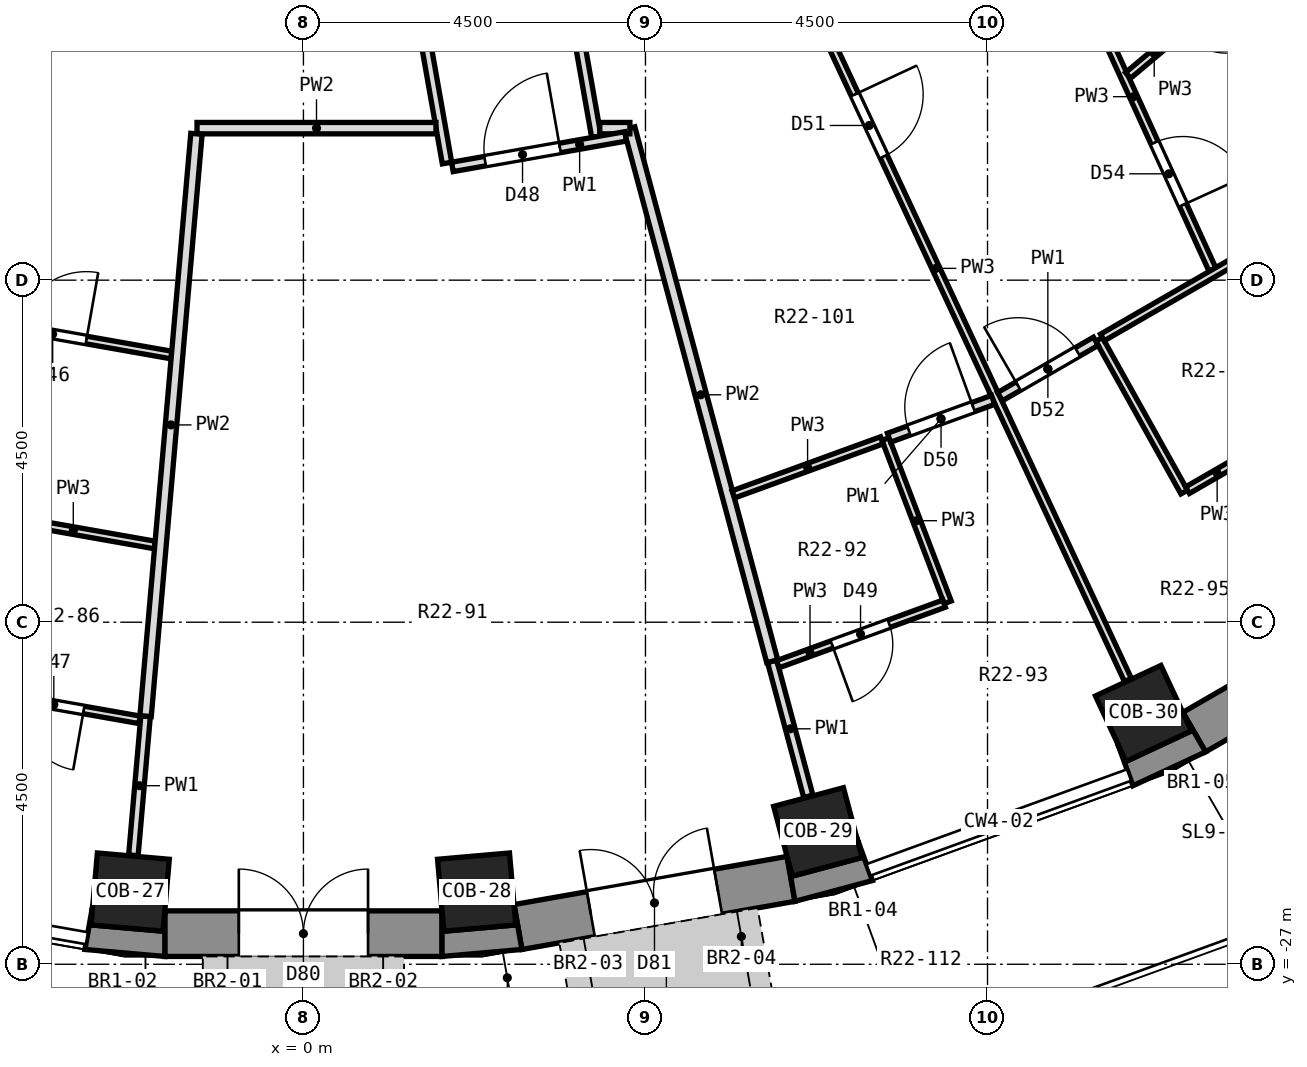
"""IFC4 building model, lengths in metres.
Left out: names, types, materials, properties, quantities, classifications, styles, units other than length and angle.
Written with IfcOpenShell. Run it as: python <this file> out.ifc"""

import sys

from ifc_helpers import new_model, si_unit, direction, frame, frame_2d, origin, origin_2d, place, context, subcontext, project, spatial, polyline, rectangle, outline, extrude, element, fill, save


model = new_model("IFC4")
c1 = context("Model", 3, precision=1e-05, world=origin(), true_north=direction((0.0, 1.0)))
c2 = subcontext(c1, "Body", "Model", "MODEL_VIEW")
j1 = project(units=[si_unit("LENGTHUNIT", "METRE"), si_unit("PLANEANGLEUNIT", "RADIAN")], contexts=[c1])
p1 = place(None, origin())
s1 = spatial("IfcSite", under=j1, at=p1, CompositionType="ELEMENT")
p2 = place(p1, origin())
s2 = spatial("IfcBuilding", under=s1, at=p2, CompositionType="ELEMENT")
p3 = place(p2, frame((0.0, 0.0, 141.4)))
s3 = spatial("IfcBuildingStorey", under=s2, at=p3, CompositionType="ELEMENT", Elevation=141.4)
for number, where, z_axis, x_axis in (
    (1, (-2.279, -26.051, 0.0), (0.0, 0.0, 1.0), (-0.087, -0.996, 0.0)),
    (2, (2.279, -26.051, 0.0), (0.0, 0.0, 1.0), (0.087, -0.996, 0.0)),
    (3, (6.768, -25.259, 0.0), (0.0, 0.0, 1.0), (0.259, -0.966, 0.0)),
    (4, (11.052, -23.7, 0.0), (0.0, 0.0, 1.0), (0.423, -0.906, 0.0)),
):
    element("IfcColumn", number, at=place(p3, frame(where, z_axis=z_axis, x_axis=x_axis)), inside=s3, PredefinedType="COLUMN", context=c2, shape_type="SweptSolid", body=[
        extrude(rectangle(XDim=0.95, YDim=0.95, at=origin_2d()), origin(), (0.0, 0.0, 1.0), 3.3),
    ])
p4 = place(p3, frame((-1.824, -26.597, 0.0), z_axis=(0.0, 0.0, 1.0), x_axis=(1.0, 0.0, 0.0)))
e5 = element("IfcWall", 5, at=p4, inside=s3, PredefinedType="SOLIDWALL", context=c2, shape_type="SweptSolid", body=[
    extrude(rectangle(XDim=3.648, YDim=0.6, at=frame_2d((1.824, 0.0))), origin(), (0.0, 0.0, 1.0), 2.8),
])
p5 = place(p4, frame((0.974, 0.0, 0.0)))
e6 = element("IfcOpeningElement", 6, at=p5, cuts=e5, PredefinedType="OPENING", context=c2, shape_type="SweptSolid", body=[
    extrude(rectangle(XDim=1.7, YDim=2.4, at=frame_2d((0.85, 1.2))), frame((0.0, 0.312, 0.0), z_axis=(0.0, -1.0, 0.0), x_axis=(1.0, 0.0, 0.0)), (0.0, 0.0, 1.0), 0.624),
])
p6 = place(p3, frame((2.822, -26.51, 0.0), z_axis=(0.0, 0.0, 1.0), x_axis=(0.984803764455, 0.173670796382, 0.0)))
e7 = element("IfcWall", 7, at=p6, inside=s3, PredefinedType="SOLIDWALL", context=c2, shape_type="SweptSolid", body=[
    extrude(rectangle(XDim=3.648, YDim=0.6, at=frame_2d((1.824, 0.0))), origin(), (0.0, 0.0, 1.0), 2.8),
])
p7 = place(p6, frame((0.974, 0.0, 0.0)))
e8 = element("IfcOpeningElement", 8, at=p7, cuts=e7, PredefinedType="OPENING", context=c2, shape_type="SweptSolid", body=[
    extrude(rectangle(XDim=1.7, YDim=2.4, at=frame_2d((0.85, 1.2))), frame((0.0, 0.312, 0.0), z_axis=(0.0, -1.0, 0.0), x_axis=(1.0, 0.0, 0.0)), (0.0, 0.0, 1.0), 0.624),
])
p8 = place(p3, frame((11.719, -23.946, 0.0), z_axis=(0.0, 0.0, 1.0), x_axis=(0.866051847062, 0.499954196102, 0.0)))
e9 = element("IfcWall", 9, at=p8, inside=s3, PredefinedType="SOLIDWALL", context=c2, shape_type="SweptSolid", body=[
    extrude(rectangle(XDim=3.648, YDim=0.6, at=frame_2d((1.824, 0.0))), origin(), (0.0, 0.0, 1.0), 2.8),
])
p9 = place(p8, frame((0.674, 0.0, 0.9)))
e10 = element("IfcOpeningElement", 10, at=p9, cuts=e9, PredefinedType="OPENING", context=c2, shape_type="SweptSolid", body=[
    extrude(rectangle(XDim=2.3, YDim=1.8, at=frame_2d((1.15, 0.9))), frame((0.0, 0.312, 0.0), z_axis=(0.0, -1.0, 0.0), x_axis=(1.0, 0.0, 0.0)), (0.0, 0.0, 1.0), 0.624),
])
p10 = place(p3, origin())
e11 = element("IfcWall", 11, at=p10, inside=s3, PredefinedType="SOLIDWALL", context=c2, shape_type="SweptSolid", body=[
    extrude(outline(polyline([(-2.875, -26.805), (-1.824, -26.897), (-1.824, -26.297), (-1.847, -26.565), (-2.794, -26.482), (-2.77, -26.215), (-2.875, -26.805)])), origin(), (0.0, 0.0, 1.0), 2.8),
])
p11 = place(p3, origin())
e12 = element("IfcWall", 12, at=p11, inside=s3, PredefinedType="SOLIDWALL", context=c2, shape_type="SweptSolid", body=[
    extrude(outline(polyline([(2.875, -26.805), (2.77, -26.215), (2.794, -26.482), (1.847, -26.565), (1.824, -26.297), (1.824, -26.897), (2.875, -26.805)])), origin(), (0.0, 0.0, 1.0), 2.8),
])
p12 = place(p3, origin())
e13 = element("IfcWall", 13, at=p12, inside=s3, PredefinedType="SOLIDWALL", context=c2, shape_type="SweptSolid", body=[
    extrude(outline(polyline([(6.467, -26.172), (7.486, -25.899), (7.28, -25.335), (7.35, -25.595), (6.432, -25.841), (6.363, -25.581), (6.467, -26.172)])), origin(), (0.0, 0.0, 1.0), 2.8),
])
p13 = place(p3, origin())
e14 = element("IfcWall", 14, at=p13, inside=s3, PredefinedType="SOLIDWALL", context=c2, shape_type="SweptSolid", body=[
    extrude(outline(polyline([(10.913, -24.651), (11.869, -24.206), (11.569, -23.686), (11.683, -23.93), (10.822, -24.331), (10.708, -24.087), (10.913, -24.651)])), origin(), (0.0, 0.0, 1.0), 2.8),
])
p14 = place(p3, frame((1.032, -11.597, 0.0), z_axis=(0.0, 0.0, 1.0), x_axis=(0.173613257536, -0.984813909735, 0.0)))
e15 = element("IfcWall", 15, at=p14, inside=s3, PredefinedType="PARTITIONING", context=c2, shape_type="SweptSolid", body=[
    extrude(rectangle(XDim=4.937, YDim=0.125, at=frame_2d((2.469, 0.0))), origin(), (0.0, 0.0, 1.0), 2.8),
])
p15 = place(p3, frame((3.344, -13.22, 0.0), z_axis=(0.0, 0.0, 1.0), x_axis=(0.173704731119, -0.984797779438, 0.0)))
e16 = element("IfcWall", 16, at=p15, inside=s3, PredefinedType="PARTITIONING", context=c2, shape_type="SweptSolid", body=[
    extrude(rectangle(XDim=2.938, YDim=0.125, at=frame_2d((1.469, 0.0))), origin(), (0.0, 0.0, 1.0), 2.8),
])
p16 = place(p3, frame((6.166, -23.014, 0.0), z_axis=(0.0, 0.0, 1.0), x_axis=(0.258802424466, -0.965930279622, 0.0)))
e17 = element("IfcWall", 17, at=p16, inside=s3, PredefinedType="PARTITIONING", context=c2, shape_type="SweptSolid", body=[
    extrude(rectangle(XDim=1.84, YDim=0.125, at=frame_2d((0.92, 0.0))), origin(), (0.0, 0.0, 1.0), 2.8),
])
p17 = place(p3, frame((4.288, -16.002, 0.0), z_axis=(0.0, 0.0, 1.0), x_axis=(0.25900000819, -0.965877319207, 0.0)))
e18 = element("IfcWall", 18, at=p17, inside=s3, PredefinedType="PARTITIONING", context=c2, shape_type="SweptSolid", body=[
    extrude(rectangle(XDim=7.259, YDim=0.15, at=frame_2d((3.63, 0.0))), origin(), (0.0, 0.0, 1.0), 2.8),
])
p18 = place(p3, frame((7.657, -20.09, 0.0), z_axis=(0.0, 0.0, 1.0), x_axis=(0.35616749028, -0.934422130981, 0.0)))
e19 = element("IfcWall", 19, at=p18, inside=s3, PredefinedType="PARTITIONING", context=c2, shape_type="SweptSolid", body=[
    extrude(rectangle(XDim=2.3, YDim=0.1, at=frame_2d((1.15, 0.0))), origin(), (0.0, 0.0, 1.0), 2.8),
])
p19 = place(p3, frame((9.883, -13.312, 0.0), z_axis=(0.0, 0.0, 1.0), x_axis=(0.415273903312, -0.909696424764, 0.0)))
e20 = element("IfcWall", 20, at=p19, inside=s3, PredefinedType="PARTITIONING", context=c2, shape_type="SweptSolid", body=[
    extrude(rectangle(XDim=5.0, YDim=0.1, at=frame_2d((2.5, 0.0))), origin(), (0.0, 0.0, 1.0), 2.8),
])
p20 = place(p19, frame((3.166, 0.0, 0.0)))
e21 = element("IfcOpeningElement", 21, at=p20, cuts=e20, PredefinedType="OPENING", context=c2, shape_type="SweptSolid", body=[
    extrude(rectangle(XDim=0.9, YDim=2.1, at=frame_2d((0.45, 1.05))), frame((0.0, 0.062, 0.0), z_axis=(0.0, -1.0, 0.0), x_axis=(1.0, 0.0, 0.0)), (0.0, 0.0, 1.0), 0.124),
])
p21 = place(p3, frame((5.794, -12.43, 0.0), z_axis=(0.0, 0.0, 1.0), x_axis=(0.422795993745, -0.906224888023, 0.0)))
e22 = element("IfcWall", 22, at=p21, inside=s3, PredefinedType="PARTITIONING", context=c2, shape_type="SweptSolid", body=[
    extrude(rectangle(XDim=11.951, YDim=0.1, at=frame_2d((5.975, 0.0))), origin(), (0.0, 0.0, 1.0), 2.8),
])
p22 = place(p21, frame((3.451, 0.0, 0.0)))
e23 = element("IfcOpeningElement", 23, at=p22, cuts=e22, PredefinedType="OPENING", context=c2, shape_type="SweptSolid", body=[
    extrude(rectangle(XDim=0.9, YDim=2.1, at=frame_2d((0.45, 1.05))), frame((0.0, 0.062, 0.0), z_axis=(0.0, -1.0, 0.0), x_axis=(1.0, 0.0, 0.0)), (0.0, 0.0, 1.0), 0.124),
])
p23 = place(p3, frame((10.468, -18.779, 0.0), z_axis=(0.0, 0.0, 1.0), x_axis=(0.486886136125, -0.873465448915, 0.0)))
e24 = element("IfcWall", 24, at=p23, inside=s3, PredefinedType="PARTITIONING", context=c2, shape_type="SweptSolid", body=[
    extrude(rectangle(XDim=2.3, YDim=0.1, at=frame_2d((1.15, 0.0))), origin(), (0.0, 0.0, 1.0), 2.8),
])
p24 = place(p3, frame((-4.486, -23.373, 0.0), z_axis=(0.0, 0.0, 1.0), x_axis=(0.984805365509, -0.173661717325, 0.0)))
e25 = element("IfcWall", 25, at=p24, inside=s3, PredefinedType="PARTITIONING", context=c2, shape_type="SweptSolid", body=[
    extrude(rectangle(XDim=2.366, YDim=0.1, at=frame_2d((1.183, 0.0))), origin(), (0.0, 0.0, 1.0), 2.8),
])
p25 = place(p24, frame((0.821, 0.0, 0.0)))
e26 = element("IfcOpeningElement", 26, at=p25, cuts=e25, PredefinedType="OPENING", context=c2, shape_type="SweptSolid", body=[
    extrude(rectangle(XDim=0.8, YDim=2.1, at=frame_2d((0.4, 1.05))), frame((0.0, 0.062, 0.0), z_axis=(0.0, -1.0, 0.0), x_axis=(1.0, 0.0, 0.0)), (0.0, 0.0, 1.0), 0.124),
])
p26 = place(p3, frame((-4.101, -21.105, 0.0), z_axis=(0.0, 0.0, 1.0), x_axis=(0.984793705714, -0.173727825019, 0.0)))
e27 = element("IfcWall", 27, at=p26, inside=s3, PredefinedType="PARTITIONING", context=c2, shape_type="SweptSolid", body=[
    extrude(rectangle(XDim=2.18, YDim=0.1, at=frame_2d((1.09, 0.0))), origin(), (0.0, 0.0, 1.0), 2.8),
])
p27 = place(p3, frame((-4.887, -18.43, 0.0), z_axis=(0.0, 0.0, 1.0), x_axis=(0.984827318257, -0.173537181071, 0.0)))
e28 = element("IfcWall", 28, at=p27, inside=s3, PredefinedType="PARTITIONING", context=c2, shape_type="SweptSolid", body=[
    extrude(rectangle(XDim=3.199, YDim=0.1, at=frame_2d((1.6, 0.0))), origin(), (0.0, 0.0, 1.0), 2.8),
])
p28 = place(p27, frame((1.162, 0.0, 0.0)))
e29 = element("IfcOpeningElement", 29, at=p28, cuts=e28, PredefinedType="OPENING", context=c2, shape_type="SweptSolid", body=[
    extrude(rectangle(XDim=0.9, YDim=2.1, at=frame_2d((0.45, 1.05))), frame((0.0, 0.062, 0.0), z_axis=(0.0, -1.0, 0.0), x_axis=(1.0, 0.0, 0.0)), (0.0, 0.0, 1.0), 0.124),
])
p29 = place(p3, frame((-1.4, -16.0, 0.0), z_axis=(0.0, 0.0, 1.0), x_axis=(1.0, 0.0, 0.0)))
e30 = element("IfcWall", 30, at=p29, inside=s3, PredefinedType="PARTITIONING", context=c2, shape_type="SweptSolid", body=[
    extrude(rectangle(XDim=3.143, YDim=0.15, at=frame_2d((1.572, 0.0))), origin(), (0.0, 0.0, 1.0), 2.8),
])
p30 = place(p3, frame((3.899, -16.0, 0.0), z_axis=(0.0, 0.0, 1.0), x_axis=(1.0, 0.0, 0.0)))
e31 = element("IfcWall", 31, at=p30, inside=s3, PredefinedType="PARTITIONING", context=c2, shape_type="SweptSolid", body=[
    extrude(rectangle(XDim=0.396, YDim=0.15, at=frame_2d((0.198, 0.0))), origin(), (0.0, 0.0, 1.0), 2.8),
])
p31 = place(p3, frame((1.959, -16.51, 0.0), z_axis=(0.0, 0.0, 1.0), x_axis=(0.984826011904, 0.173544594492, 0.0)))
e32 = element("IfcWall", 32, at=p31, inside=s3, PredefinedType="PARTITIONING", context=c2, shape_type="SweptSolid", body=[
    extrude(rectangle(XDim=2.314, YDim=0.125, at=frame_2d((1.157, 0.0))), origin(), (0.0, 0.0, 1.0), 2.8),
])
p32 = place(p31, frame((0.437, 0.0, 0.0)))
e33 = element("IfcOpeningElement", 33, at=p32, cuts=e32, PredefinedType="OPENING", context=c2, shape_type="SweptSolid", body=[
    extrude(rectangle(XDim=1.0, YDim=2.1, at=frame_2d((0.5, 1.05))), frame((0.0, 0.074, 0.0), z_axis=(0.0, -1.0, 0.0), x_axis=(1.0, 0.0, 0.0)), (0.0, 0.0, 1.0), 0.149),
])
p33 = place(p3, frame((6.242, -23.053, 0.0), z_axis=(0.0, 0.0, 1.0), x_axis=(0.939618756308, 0.342223016166, 0.0)))
e34 = element("IfcWall", 34, at=p33, inside=s3, PredefinedType="PARTITIONING", context=c2, shape_type="SweptSolid", body=[
    extrude(rectangle(XDim=2.328, YDim=0.1, at=frame_2d((1.164, 0.0))), origin(), (0.0, 0.0, 1.0), 2.8),
])
p34 = place(p33, frame((0.758, 0.0, 0.0)))
e35 = element("IfcOpeningElement", 35, at=p34, cuts=e34, PredefinedType="OPENING", context=c2, shape_type="SweptSolid", body=[
    extrude(rectangle(XDim=0.8, YDim=2.1, at=frame_2d((0.4, 1.05))), frame((0.0, 0.062, 0.0), z_axis=(0.0, -1.0, 0.0), x_axis=(1.0, 0.0, 0.0)), (0.0, 0.0, 1.0), 0.124),
])
p35 = place(p3, frame((5.656, -20.818, 0.0), z_axis=(0.0, 0.0, 1.0), x_axis=(0.939728291625, 0.341922122596, 0.0)))
e36 = element("IfcWall", 36, at=p35, inside=s3, PredefinedType="PARTITIONING", context=c2, shape_type="SweptSolid", body=[
    extrude(rectangle(XDim=2.08, YDim=0.1, at=frame_2d((1.04, 0.0))), origin(), (0.0, 0.0, 1.0), 2.8),
])
p36 = place(p3, frame((7.704, -20.073, 0.0), z_axis=(0.0, 0.0, 1.0), x_axis=(0.939788529673, 0.341756520778, 0.0)))
e37 = element("IfcWall", 37, at=p36, inside=s3, PredefinedType="PARTITIONING", context=c2, shape_type="SweptSolid", body=[
    extrude(rectangle(XDim=1.457, YDim=0.125, at=frame_2d((0.728, 0.0))), origin(), (0.0, 0.0, 1.0), 2.8),
])
p37 = place(p36, frame((0.278, 0.0, 0.0)))
e38 = element("IfcOpeningElement", 38, at=p37, cuts=e37, PredefinedType="OPENING", context=c2, shape_type="SweptSolid", body=[
    extrude(rectangle(XDim=0.9, YDim=2.1, at=frame_2d((0.45, 1.05))), frame((0.0, 0.074, 0.0), z_axis=(0.0, -1.0, 0.0), x_axis=(1.0, 0.0, 0.0)), (0.0, 0.0, 1.0), 0.149),
])
p38 = place(p3, frame((11.631, -20.763, 0.0), z_axis=(0.0, 0.0, 1.0), x_axis=(0.866130014302, 0.499818765479, 0.0)))
e39 = element("IfcWall", 39, at=p38, inside=s3, PredefinedType="PARTITIONING", context=c2, shape_type="SweptSolid", body=[
    extrude(rectangle(XDim=2.341, YDim=0.1, at=frame_2d((1.17, 0.0))), origin(), (0.0, 0.0, 1.0), 2.8),
])
p39 = place(p38, frame((0.771, 0.0, 0.0)))
e40 = element("IfcOpeningElement", 40, at=p39, cuts=e39, PredefinedType="OPENING", context=c2, shape_type="SweptSolid", body=[
    extrude(rectangle(XDim=0.8, YDim=2.1, at=frame_2d((0.4, 1.05))), frame((0.0, 0.062, 0.0), z_axis=(0.0, -1.0, 0.0), x_axis=(1.0, 0.0, 0.0)), (0.0, 0.0, 1.0), 0.124),
])
p40 = place(p3, frame((10.511, -18.754, 0.0), z_axis=(0.0, 0.0, 1.0), x_axis=(0.866071606143, 0.499919966627, 0.0)))
e41 = element("IfcWall", 41, at=p40, inside=s3, PredefinedType="PARTITIONING", context=c2, shape_type="SweptSolid", body=[
    extrude(rectangle(XDim=2.104, YDim=0.1, at=frame_2d((1.052, 0.0))), origin(), (0.0, 0.0, 1.0), 2.8),
])
p41 = place(p3, frame((9.163, -19.533, 0.0), z_axis=(0.0, 0.0, 1.0), x_axis=(0.865819905352, 0.500355764928, 0.0)))
e42 = element("IfcWall", 42, at=p41, inside=s3, PredefinedType="PARTITIONING", context=c2, shape_type="SweptSolid", body=[
    extrude(rectangle(XDim=1.457, YDim=0.125, at=frame_2d((0.729, 0.0))), origin(), (0.0, 0.0, 1.0), 2.8),
])
p42 = place(p41, frame((0.279, 0.0, 0.0)))
e43 = element("IfcOpeningElement", 43, at=p42, cuts=e42, PredefinedType="OPENING", context=c2, shape_type="SweptSolid", body=[
    extrude(rectangle(XDim=0.9, YDim=2.1, at=frame_2d((0.45, 1.05))), frame((0.0, 0.074, 0.0), z_axis=(0.0, -1.0, 0.0), x_axis=(1.0, 0.0, 0.0)), (0.0, 0.0, 1.0), 0.149),
])
p43 = place(p3, frame((10.848, -15.307, 0.0), z_axis=(0.0, 0.0, 1.0), x_axis=(0.766356114298, 0.642415991456, 0.0)))
e44 = element("IfcWall", 44, at=p43, inside=s3, PredefinedType="PARTITIONING", context=c2, shape_type="SweptSolid", body=[
    extrude(rectangle(XDim=2.332, YDim=0.1, at=frame_2d((1.166, 0.0))), origin(), (0.0, 0.0, 1.0), 2.8),
])
p44 = place(p43, frame((0.902, 0.0, 0.0)))
e45 = element("IfcOpeningElement", 45, at=p44, cuts=e44, PredefinedType="OPENING", context=c2, shape_type="SweptSolid", body=[
    extrude(rectangle(XDim=0.8, YDim=2.1, at=frame_2d((0.4, 1.05))), frame((0.0, 0.062, 0.0), z_axis=(0.0, -1.0, 0.0), x_axis=(1.0, 0.0, 0.0)), (0.0, 0.0, 1.0), 0.124),
])
p45 = place(p3, frame((-2.237, -25.567, 0.0), z_axis=(0.0, 0.0, 1.0), x_axis=(0.087185058121, 0.996192132894, 0.0)))
e46 = element("IfcWall", 46, at=p45, inside=s3, PredefinedType="PARTITIONING", context=c2, shape_type="SweptSolid", body=[
    extrude(rectangle(XDim=1.84, YDim=0.125, at=frame_2d((0.92, 0.0))), origin(), (0.0, 0.0, 1.0), 2.8),
])
p46 = place(p3, frame((-2.077, -23.735, 0.0), z_axis=(0.0, 0.0, 1.0), x_axis=(0.087062572149, 0.996202845073, 0.0)))
e47 = element("IfcWall", 47, at=p46, inside=s3, PredefinedType="PARTITIONING", context=c2, shape_type="SweptSolid", body=[
    extrude(rectangle(XDim=7.689, YDim=0.15, at=frame_2d((3.845, 0.0))), origin(), (0.0, 0.0, 1.0), 2.8),
])
p47 = place(p5, origin())
e48 = element("IfcDoor", 48, at=p47, inside=s3, OperationType="DOUBLE_DOOR_SINGLE_SWING", PredefinedType="DOOR", context=c2, shape_type="SweptSolid", body=[
    extrude(rectangle(XDim=1.7, YDim=2.4, at=frame_2d((0.85, 1.2))), frame((0.0, 0.125, 0.0), z_axis=(0.0, -1.0, 0.0), x_axis=(1.0, 0.0, 0.0)), (0.0, 0.0, 1.0), 0.05),
])
fill(e6, e48)
p48 = place(p7, origin())
e49 = element("IfcDoor", 49, at=p48, inside=s3, OperationType="DOUBLE_DOOR_SINGLE_SWING", PredefinedType="DOOR", context=c2, shape_type="SweptSolid", body=[
    extrude(rectangle(XDim=1.7, YDim=2.4, at=frame_2d((0.85, 1.2))), frame((0.0, 0.125, 0.0), z_axis=(0.0, -1.0, 0.0), x_axis=(1.0, 0.0, 0.0)), (0.0, 0.0, 1.0), 0.05),
])
fill(e8, e49)
p49 = place(p28, origin())
e50 = element("IfcDoor", 50, at=p49, inside=s3, OperationType="SINGLE_SWING_RIGHT", PredefinedType="DOOR", context=c2, shape_type="SweptSolid", body=[
    extrude(rectangle(XDim=0.9, YDim=2.1, at=frame_2d((0.45, 1.05))), frame((0.0, 0.025, 0.0), z_axis=(0.0, -1.0, 0.0), x_axis=(1.0, 0.0, 0.0)), (0.0, 0.0, 1.0), 0.05),
])
fill(e29, e50)
p50 = place(p25, frame((0.8, 0.0, 0.0), z_axis=(0.0, 0.0, 1.0), x_axis=(-1.0, 0.0, 0.0)))
e51 = element("IfcDoor", 51, at=p50, inside=s3, OperationType="SINGLE_SWING_LEFT", PredefinedType="DOOR", context=c2, shape_type="SweptSolid", body=[
    extrude(rectangle(XDim=0.8, YDim=2.1, at=frame_2d((0.4, 1.05))), frame((0.0, 0.025, 0.0), z_axis=(0.0, -1.0, 0.0), x_axis=(1.0, 0.0, 0.0)), (0.0, 0.0, 1.0), 0.05),
])
fill(e26, e51)
p51 = place(p32, origin())
e52 = element("IfcDoor", 52, at=p51, inside=s3, OperationType="SINGLE_SWING_RIGHT", PredefinedType="DOOR", context=c2, shape_type="SweptSolid", body=[
    extrude(rectangle(XDim=1.0, YDim=2.1, at=frame_2d((0.5, 1.05))), frame((0.0, 0.025, 0.0), z_axis=(0.0, -1.0, 0.0), x_axis=(1.0, 0.0, 0.0)), (0.0, 0.0, 1.0), 0.05),
])
fill(e33, e52)
p52 = place(p34, frame((0.8, 0.0, 0.0), z_axis=(0.0, 0.0, 1.0), x_axis=(-1.0, 0.0, 0.0)))
e53 = element("IfcDoor", 53, at=p52, inside=s3, OperationType="SINGLE_SWING_RIGHT", PredefinedType="DOOR", context=c2, shape_type="SweptSolid", body=[
    extrude(rectangle(XDim=0.8, YDim=2.1, at=frame_2d((0.4, 1.05))), frame((0.0, 0.025, 0.0), z_axis=(0.0, -1.0, 0.0), x_axis=(1.0, 0.0, 0.0)), (0.0, 0.0, 1.0), 0.05),
])
fill(e35, e53)
p53 = place(p37, origin())
e54 = element("IfcDoor", 54, at=p53, inside=s3, OperationType="SINGLE_SWING_RIGHT", PredefinedType="DOOR", context=c2, shape_type="SweptSolid", body=[
    extrude(rectangle(XDim=0.9, YDim=2.1, at=frame_2d((0.45, 1.05))), frame((0.0, 0.025, 0.0), z_axis=(0.0, -1.0, 0.0), x_axis=(1.0, 0.0, 0.0)), (0.0, 0.0, 1.0), 0.05),
])
fill(e38, e54)
p54 = place(p22, origin())
e55 = element("IfcDoor", 55, at=p54, inside=s3, OperationType="SINGLE_SWING_LEFT", PredefinedType="DOOR", context=c2, shape_type="SweptSolid", body=[
    extrude(rectangle(XDim=0.9, YDim=2.1, at=frame_2d((0.45, 1.05))), frame((0.0, 0.025, 0.0), z_axis=(0.0, -1.0, 0.0), x_axis=(1.0, 0.0, 0.0)), (0.0, 0.0, 1.0), 0.05),
])
fill(e23, e55)
p55 = place(p42, origin())
e56 = element("IfcDoor", 56, at=p55, inside=s3, OperationType="SINGLE_SWING_LEFT", PredefinedType="DOOR", context=c2, shape_type="SweptSolid", body=[
    extrude(rectangle(XDim=0.9, YDim=2.1, at=frame_2d((0.45, 1.05))), frame((0.0, 0.025, 0.0), z_axis=(0.0, -1.0, 0.0), x_axis=(1.0, 0.0, 0.0)), (0.0, 0.0, 1.0), 0.05),
])
fill(e43, e56)
p56 = place(p20, origin())
e57 = element("IfcDoor", 57, at=p56, inside=s3, OperationType="SINGLE_SWING_RIGHT", PredefinedType="DOOR", context=c2, shape_type="SweptSolid", body=[
    extrude(rectangle(XDim=0.9, YDim=2.1, at=frame_2d((0.45, 1.05))), frame((0.0, 0.025, 0.0), z_axis=(0.0, -1.0, 0.0), x_axis=(1.0, 0.0, 0.0)), (0.0, 0.0, 1.0), 0.05),
])
fill(e21, e57)
save(model, sys.argv[1])
